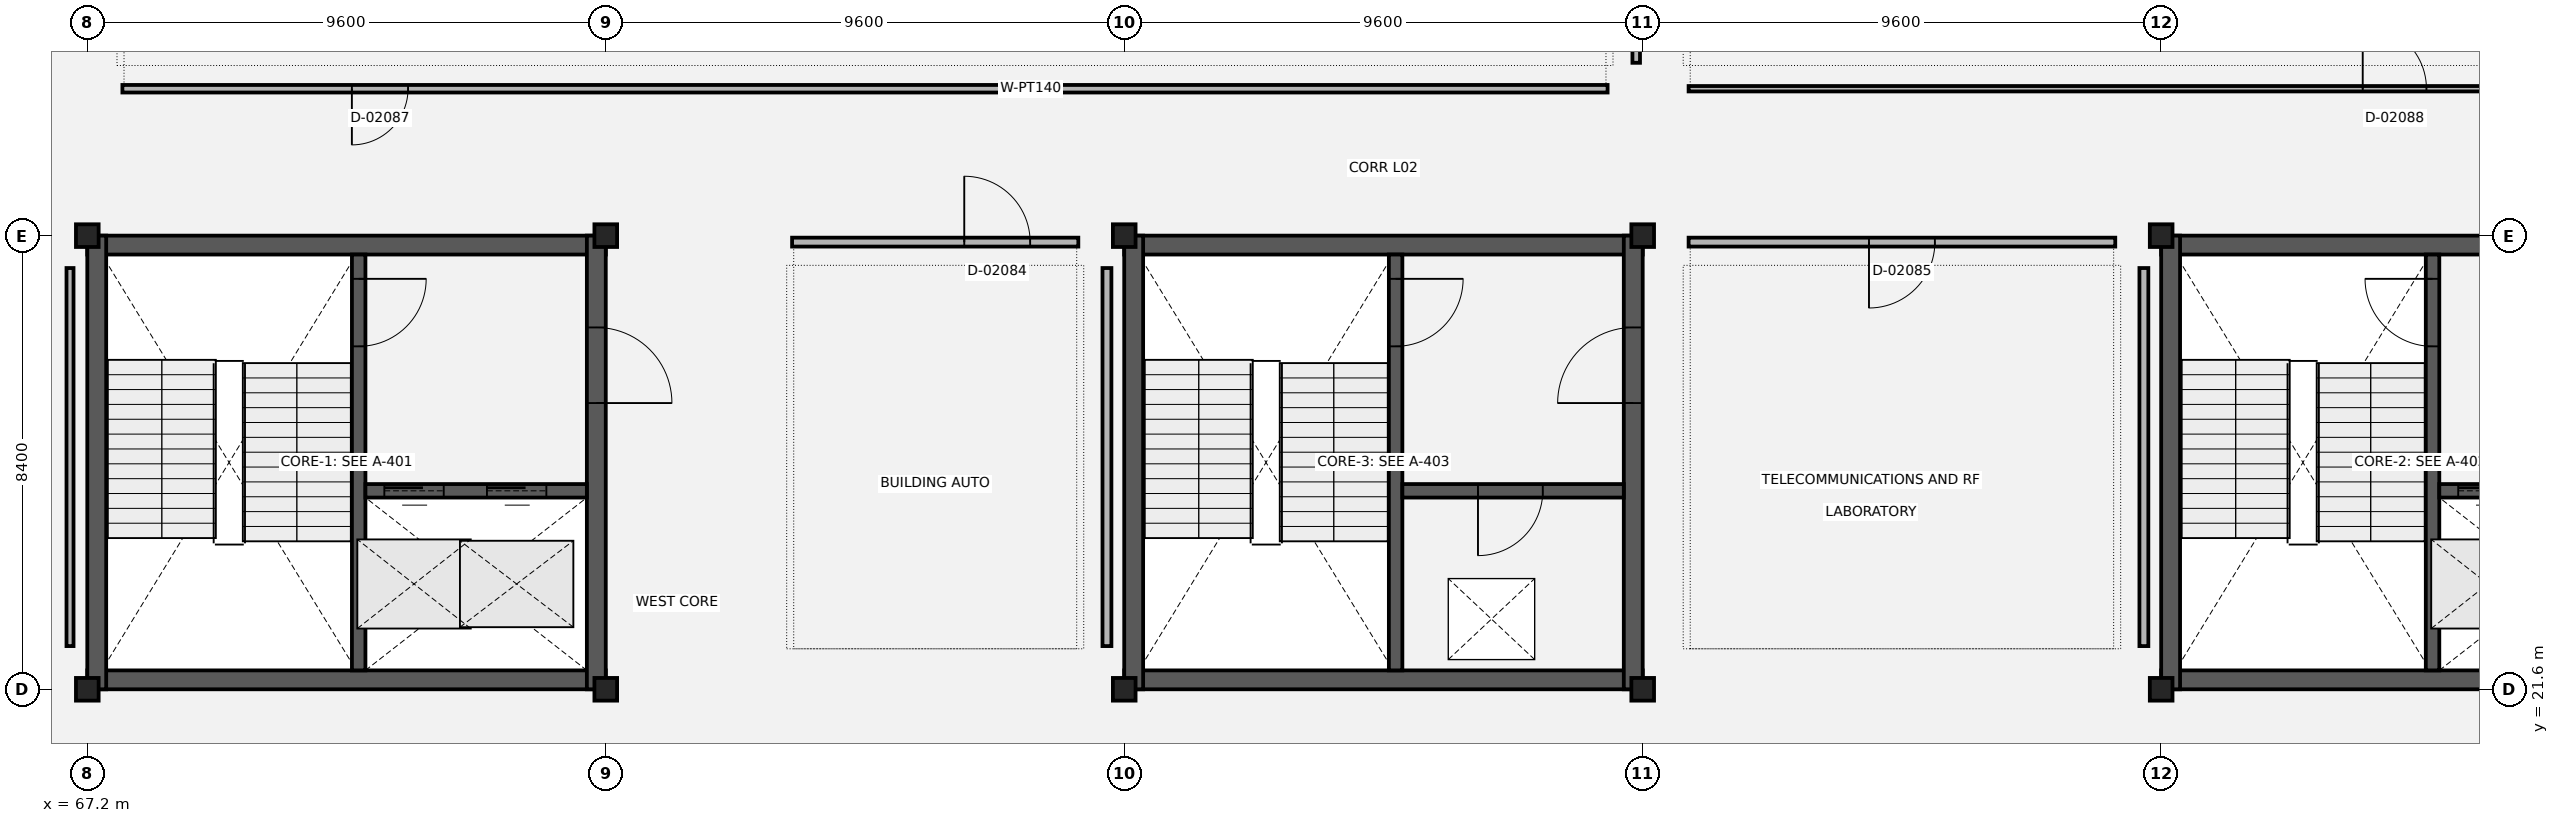
"""IFC4 building model, lengths in metres.
Left out: names, types, materials, properties, quantities, classifications, styles, units other than length and angle.
Written with IfcOpenShell. Run it as: python <this file> out.ifc"""

import sys

from ifc_helpers import new_model, si_unit, direction, frame, frame_2d, origin, origin_2d, place, context, subcontext, project, spatial, rectangle, extrude, element, fill, save


model = new_model("IFC4")
c1 = context("Model", 3, precision=1e-05, world=origin(), true_north=direction((0.0, 1.0)))
c2 = subcontext(c1, "Body", "Model", "MODEL_VIEW")
j1 = project(units=[si_unit("LENGTHUNIT", "METRE"), si_unit("PLANEANGLEUNIT", "RADIAN")], contexts=[c1])
p1 = place(None, origin())
s1 = spatial("IfcSite", under=j1, at=p1, CompositionType="ELEMENT")
p2 = place(p1, origin())
s2 = spatial("IfcBuilding", under=s1, at=p2, CompositionType="ELEMENT")
p3 = place(p2, frame((0.0, 0.0, 10.2)))
s3 = spatial("IfcBuildingStorey", under=s2, at=p3, CompositionType="ELEMENT", Elevation=10.2)
for number, where, z_axis, x_axis in (
    (1, (67.2, 21.6, 0.0), (0.0, 0.0, 1.0), (1.0, 0.0, 0.0)),
    (2, (67.2, 30.0, 0.0), (0.0, 0.0, 1.0), (1.0, 0.0, 0.0)),
    (3, (76.8, 21.6, 0.0), (0.0, 0.0, 1.0), (1.0, 0.0, 0.0)),
    (4, (76.8, 30.0, 0.0), (0.0, 0.0, 1.0), (1.0, 0.0, 0.0)),
    (5, (86.4, 21.6, 0.0), (0.0, 0.0, 1.0), (1.0, 0.0, 0.0)),
    (6, (86.4, 30.0, 0.0), (0.0, 0.0, 1.0), (1.0, 0.0, 0.0)),
    (7, (96.0, 21.6, 0.0), (0.0, 0.0, 1.0), (1.0, 0.0, 0.0)),
    (8, (96.0, 30.0, 0.0), (0.0, 0.0, 1.0), (1.0, 0.0, 0.0)),
    (9, (105.6, 21.6, 0.0), (0.0, 0.0, 1.0), (1.0, 0.0, 0.0)),
    (10, (105.6, 30.0, 0.0), (0.0, 0.0, 1.0), (1.0, 0.0, 0.0)),
):
    element("IfcColumn", number, at=place(p3, frame(where, z_axis=z_axis, x_axis=x_axis)), inside=s3, PredefinedType="COLUMN", context=c2, shape_type="SweptSolid", body=[
        extrude(rectangle(XDim=0.42, YDim=0.42, at=origin_2d()), origin(), (0.0, 0.0, 1.0), 4.2),
    ])
for number, where, z_axis, x_axis in (
    (11, (67.2, 29.825, 0.0), (0.0, 0.0, 1.0), (1.0, 0.0, 0.0)),
    (12, (67.2, 21.775, 0.0), (0.0, 0.0, 1.0), (1.0, 0.0, 0.0)),
):
    element("IfcWall", number, at=place(p3, frame(where, z_axis=z_axis, x_axis=x_axis)), inside=s3, PredefinedType="SHEAR", context=c2, shape_type="SweptSolid", body=[
        extrude(rectangle(XDim=9.6, YDim=0.35, at=frame_2d((4.8, 0.0))), origin(), (0.0, 0.0, 1.0), 3.95),
    ])
p4 = place(p3, frame((67.375, 21.6, 0.0), z_axis=(0.0, 0.0, 1.0), x_axis=(0.0, 1.0, 0.0)))
e13 = element("IfcWall", 13, at=p4, inside=s3, PredefinedType="SHEAR", context=c2, shape_type="SweptSolid", body=[
    extrude(rectangle(XDim=8.4, YDim=0.35, at=frame_2d((4.2, 0.0))), origin(), (0.0, 0.0, 1.0), 3.95),
])
p5 = place(p3, frame((76.625, 21.6, 0.0), z_axis=(0.0, 0.0, 1.0), x_axis=(0.0, 1.0, 0.0)))
e14 = element("IfcWall", 14, at=p5, inside=s3, PredefinedType="SHEAR", context=c2, shape_type="SweptSolid", body=[
    extrude(rectangle(XDim=8.4, YDim=0.35, at=frame_2d((4.2, 0.0))), origin(), (0.0, 0.0, 1.0), 3.95),
])
p6 = place(p5, frame((5.3, 0.0, 0.0)))
e15 = element("IfcOpeningElement", 15, at=p6, cuts=e14, PredefinedType="OPENING", context=c2, shape_type="SweptSolid", body=[
    extrude(rectangle(XDim=1.4, YDim=2.15, at=frame_2d((0.7, 1.075))), frame((0.0, 0.185, 0.0), z_axis=(0.0, -1.0, 0.0), x_axis=(1.0, 0.0, 0.0)), (0.0, 0.0, 1.0), 0.37),
])
p7 = place(p3, frame((72.225, 29.65, 0.0), z_axis=(0.0, 0.0, 1.0), x_axis=(0.0, -1.0, 0.0)))
e16 = element("IfcWall", 16, at=p7, inside=s3, PredefinedType="SHEAR", context=c2, shape_type="SweptSolid", body=[
    extrude(rectangle(XDim=7.7, YDim=0.25, at=frame_2d((3.85, 0.0))), origin(), (0.0, 0.0, 1.0), 3.95),
])
p8 = place(p7, frame((0.45, 0.0, 0.0)))
e17 = element("IfcOpeningElement", 17, at=p8, cuts=e16, PredefinedType="OPENING", context=c2, shape_type="SweptSolid", body=[
    extrude(rectangle(XDim=1.25, YDim=2.15, at=frame_2d((0.625, 1.075))), frame((0.0, 0.135, 0.0), z_axis=(0.0, -1.0, 0.0), x_axis=(1.0, 0.0, 0.0)), (0.0, 0.0, 1.0), 0.27),
])
p9 = place(p3, frame((72.35, 25.275, 0.0), z_axis=(0.0, 0.0, 1.0), x_axis=(1.0, 0.0, 0.0)))
e18 = element("IfcWall", 18, at=p9, inside=s3, PredefinedType="SHEAR", context=c2, shape_type="SweptSolid", body=[
    extrude(rectangle(XDim=4.1, YDim=0.25, at=frame_2d((2.05, 0.0))), origin(), (0.0, 0.0, 1.0), 3.95),
])
p10 = place(p9, frame((0.35, 0.0, 0.0)))
e19 = element("IfcOpeningElement", 19, at=p10, cuts=e18, PredefinedType="OPENING", context=c2, shape_type="SweptSolid", body=[
    extrude(rectangle(XDim=1.1, YDim=2.15, at=frame_2d((0.55, 1.075))), frame((0.0, 0.135, 0.0), z_axis=(0.0, -1.0, 0.0), x_axis=(1.0, 0.0, 0.0)), (0.0, 0.0, 1.0), 0.27),
])
p11 = place(p9, frame((2.25, 0.0, 0.0)))
e20 = element("IfcOpeningElement", 20, at=p11, cuts=e18, PredefinedType="OPENING", context=c2, shape_type="SweptSolid", body=[
    extrude(rectangle(XDim=1.1, YDim=2.15, at=frame_2d((0.55, 1.075))), frame((0.0, 0.135, 0.0), z_axis=(0.0, -1.0, 0.0), x_axis=(1.0, 0.0, 0.0)), (0.0, 0.0, 1.0), 0.27),
])
for number, where, z_axis, x_axis in (
    (21, (105.6, 29.825, 0.0), (0.0, 0.0, 1.0), (1.0, 0.0, 0.0)),
    (22, (105.6, 21.775, 0.0), (0.0, 0.0, 1.0), (1.0, 0.0, 0.0)),
):
    element("IfcWall", number, at=place(p3, frame(where, z_axis=z_axis, x_axis=x_axis)), inside=s3, PredefinedType="SHEAR", context=c2, shape_type="SweptSolid", body=[
        extrude(rectangle(XDim=9.6, YDim=0.35, at=frame_2d((4.8, 0.0))), origin(), (0.0, 0.0, 1.0), 3.95),
    ])
p12 = place(p3, frame((105.775, 21.6, 0.0), z_axis=(0.0, 0.0, 1.0), x_axis=(0.0, 1.0, 0.0)))
e23 = element("IfcWall", 23, at=p12, inside=s3, PredefinedType="SHEAR", context=c2, shape_type="SweptSolid", body=[
    extrude(rectangle(XDim=8.4, YDim=0.35, at=frame_2d((4.2, 0.0))), origin(), (0.0, 0.0, 1.0), 3.95),
])
p13 = place(p3, frame((110.625, 29.65, 0.0), z_axis=(0.0, 0.0, 1.0), x_axis=(0.0, -1.0, 0.0)))
e24 = element("IfcWall", 24, at=p13, inside=s3, PredefinedType="SHEAR", context=c2, shape_type="SweptSolid", body=[
    extrude(rectangle(XDim=7.7, YDim=0.25, at=frame_2d((3.85, 0.0))), origin(), (0.0, 0.0, 1.0), 3.95),
])
p14 = place(p13, frame((0.45, 0.0, 0.0)))
e25 = element("IfcOpeningElement", 25, at=p14, cuts=e24, PredefinedType="OPENING", context=c2, shape_type="SweptSolid", body=[
    extrude(rectangle(XDim=1.25, YDim=2.15, at=frame_2d((0.625, 1.075))), frame((0.0, 0.135, 0.0), z_axis=(0.0, -1.0, 0.0), x_axis=(1.0, 0.0, 0.0)), (0.0, 0.0, 1.0), 0.27),
])
p15 = place(p3, frame((110.75, 25.275, 0.0), z_axis=(0.0, 0.0, 1.0), x_axis=(1.0, 0.0, 0.0)))
e26 = element("IfcWall", 26, at=p15, inside=s3, PredefinedType="SHEAR", context=c2, shape_type="SweptSolid", body=[
    extrude(rectangle(XDim=4.1, YDim=0.25, at=frame_2d((2.05, 0.0))), origin(), (0.0, 0.0, 1.0), 3.95),
])
p16 = place(p15, frame((0.35, 0.0, 0.0)))
e27 = element("IfcOpeningElement", 27, at=p16, cuts=e26, PredefinedType="OPENING", context=c2, shape_type="SweptSolid", body=[
    extrude(rectangle(XDim=1.1, YDim=2.15, at=frame_2d((0.55, 1.075))), frame((0.0, 0.135, 0.0), z_axis=(0.0, -1.0, 0.0), x_axis=(1.0, 0.0, 0.0)), (0.0, 0.0, 1.0), 0.27),
])
p17 = place(p15, frame((2.25, 0.0, 0.0)))
e28 = element("IfcOpeningElement", 28, at=p17, cuts=e26, PredefinedType="OPENING", context=c2, shape_type="SweptSolid", body=[
    extrude(rectangle(XDim=1.1, YDim=2.15, at=frame_2d((0.55, 1.075))), frame((0.0, 0.135, 0.0), z_axis=(0.0, -1.0, 0.0), x_axis=(1.0, 0.0, 0.0)), (0.0, 0.0, 1.0), 0.27),
])
for number, where, z_axis, x_axis in (
    (29, (86.4, 29.825, 0.0), (0.0, 0.0, 1.0), (1.0, 0.0, 0.0)),
    (30, (86.4, 21.775, 0.0), (0.0, 0.0, 1.0), (1.0, 0.0, 0.0)),
):
    element("IfcWall", number, at=place(p3, frame(where, z_axis=z_axis, x_axis=x_axis)), inside=s3, PredefinedType="SHEAR", context=c2, shape_type="SweptSolid", body=[
        extrude(rectangle(XDim=9.6, YDim=0.35, at=frame_2d((4.8, 0.0))), origin(), (0.0, 0.0, 1.0), 3.95),
    ])
p18 = place(p3, frame((86.575, 21.6, 0.0), z_axis=(0.0, 0.0, 1.0), x_axis=(0.0, 1.0, 0.0)))
e31 = element("IfcWall", 31, at=p18, inside=s3, PredefinedType="SHEAR", context=c2, shape_type="SweptSolid", body=[
    extrude(rectangle(XDim=8.4, YDim=0.35, at=frame_2d((4.2, 0.0))), origin(), (0.0, 0.0, 1.0), 3.95),
])
p19 = place(p3, frame((95.825, 21.6, 0.0), z_axis=(0.0, 0.0, 1.0), x_axis=(0.0, 1.0, 0.0)))
e32 = element("IfcWall", 32, at=p19, inside=s3, PredefinedType="SHEAR", context=c2, shape_type="SweptSolid", body=[
    extrude(rectangle(XDim=8.4, YDim=0.35, at=frame_2d((4.2, 0.0))), origin(), (0.0, 0.0, 1.0), 3.95),
])
p20 = place(p19, frame((5.3, 0.0, 0.0)))
e33 = element("IfcOpeningElement", 33, at=p20, cuts=e32, PredefinedType="OPENING", context=c2, shape_type="SweptSolid", body=[
    extrude(rectangle(XDim=1.4, YDim=2.15, at=frame_2d((0.7, 1.075))), frame((0.0, 0.185, 0.0), z_axis=(0.0, -1.0, 0.0), x_axis=(1.0, 0.0, 0.0)), (0.0, 0.0, 1.0), 0.37),
])
p21 = place(p3, frame((91.425, 29.65, 0.0), z_axis=(0.0, 0.0, 1.0), x_axis=(0.0, -1.0, 0.0)))
e34 = element("IfcWall", 34, at=p21, inside=s3, PredefinedType="SHEAR", context=c2, shape_type="SweptSolid", body=[
    extrude(rectangle(XDim=7.7, YDim=0.25, at=frame_2d((3.85, 0.0))), origin(), (0.0, 0.0, 1.0), 3.95),
])
p22 = place(p21, frame((0.45, 0.0, 0.0)))
e35 = element("IfcOpeningElement", 35, at=p22, cuts=e34, PredefinedType="OPENING", context=c2, shape_type="SweptSolid", body=[
    extrude(rectangle(XDim=1.25, YDim=2.15, at=frame_2d((0.625, 1.075))), frame((0.0, 0.135, 0.0), z_axis=(0.0, -1.0, 0.0), x_axis=(1.0, 0.0, 0.0)), (0.0, 0.0, 1.0), 0.27),
])
p23 = place(p3, frame((91.55, 25.275, 0.0), z_axis=(0.0, 0.0, 1.0), x_axis=(1.0, 0.0, 0.0)))
e36 = element("IfcWall", 36, at=p23, inside=s3, PredefinedType="SHEAR", context=c2, shape_type="SweptSolid", body=[
    extrude(rectangle(XDim=4.1, YDim=0.25, at=frame_2d((2.05, 0.0))), origin(), (0.0, 0.0, 1.0), 3.95),
])
p24 = place(p23, frame((1.4, 0.0, 0.0)))
e37 = element("IfcOpeningElement", 37, at=p24, cuts=e36, PredefinedType="OPENING", context=c2, shape_type="SweptSolid", body=[
    extrude(rectangle(XDim=1.2, YDim=2.15, at=frame_2d((0.6, 1.075))), frame((0.0, 0.135, 0.0), z_axis=(0.0, -1.0, 0.0), x_axis=(1.0, 0.0, 0.0)), (0.0, 0.0, 1.0), 0.27),
])
p25 = place(p3, frame((66.88, 22.4, 0.0), z_axis=(0.0, 0.0, 1.0), x_axis=(0.0, 1.0, 0.0)))
e38 = element("IfcWall", 38, at=p25, inside=s3, PredefinedType="PARTITIONING", context=c2, shape_type="SweptSolid", body=[
    extrude(rectangle(XDim=7.0, YDim=0.13, at=frame_2d((3.5, 0.0))), origin(), (0.0, 0.0, 1.0), 3.03),
])
p26 = place(p3, frame((80.25, 29.88, 0.0), z_axis=(0.0, 0.0, 1.0), x_axis=(1.0, 0.0, 0.0)))
e39 = element("IfcWall", 39, at=p26, inside=s3, PredefinedType="PARTITIONING", context=c2, shape_type="SweptSolid", body=[
    extrude(rectangle(XDim=5.3, YDim=0.165, at=frame_2d((2.65, 0.0))), origin(), (0.0, 0.0, 1.0), 3.03),
])
p27 = place(p26, frame((3.188, 0.0, 0.0)))
e40 = element("IfcOpeningElement", 40, at=p27, cuts=e39, PredefinedType="OPENING", context=c2, shape_type="SweptSolid", body=[
    extrude(rectangle(XDim=1.22, YDim=2.15, at=frame_2d((0.61, 1.075))), frame((0.0, 0.093, 0.0), z_axis=(0.0, -1.0, 0.0), x_axis=(1.0, 0.0, 0.0)), (0.0, 0.0, 1.0), 0.185),
])
p28 = place(p3, frame((86.08, 22.4, 0.0), z_axis=(0.0, 0.0, 1.0), x_axis=(0.0, 1.0, 0.0)))
e41 = element("IfcWall", 41, at=p28, inside=s3, PredefinedType="PARTITIONING", context=c2, shape_type="SweptSolid", body=[
    extrude(rectangle(XDim=7.0, YDim=0.165, at=frame_2d((3.5, 0.0))), origin(), (0.0, 0.0, 1.0), 3.03),
])
p29 = place(p3, frame((96.85, 29.88, 0.0), z_axis=(0.0, 0.0, 1.0), x_axis=(1.0, 0.0, 0.0)))
e42 = element("IfcWall", 42, at=p29, inside=s3, PredefinedType="PARTITIONING", context=c2, shape_type="SweptSolid", body=[
    extrude(rectangle(XDim=7.9, YDim=0.165, at=frame_2d((3.95, 0.0))), origin(), (0.0, 0.0, 1.0), 3.03),
])
p30 = place(p29, frame((3.34, 0.0, 0.0)))
e43 = element("IfcOpeningElement", 43, at=p30, cuts=e42, PredefinedType="OPENING", context=c2, shape_type="SweptSolid", body=[
    extrude(rectangle(XDim=1.22, YDim=2.15, at=frame_2d((0.61, 1.075))), frame((0.0, 0.093, 0.0), z_axis=(0.0, -1.0, 0.0), x_axis=(1.0, 0.0, 0.0)), (0.0, 0.0, 1.0), 0.185),
])
p31 = place(p3, frame((105.28, 22.4, 0.0), z_axis=(0.0, 0.0, 1.0), x_axis=(0.0, 1.0, 0.0)))
e44 = element("IfcWall", 44, at=p31, inside=s3, PredefinedType="PARTITIONING", context=c2, shape_type="SweptSolid", body=[
    extrude(rectangle(XDim=7.0, YDim=0.165, at=frame_2d((3.5, 0.0))), origin(), (0.0, 0.0, 1.0), 3.03),
])
p32 = place(p3, frame((67.85, 32.72, 0.0), z_axis=(0.0, 0.0, 1.0), x_axis=(1.0, 0.0, 0.0)))
e45 = element("IfcWall", 45, at=p32, inside=s3, PredefinedType="PARTITIONING", context=c2, shape_type="SweptSolid", body=[
    extrude(rectangle(XDim=27.5, YDim=0.14, at=frame_2d((13.75, 0.0))), origin(), (0.0, 0.0, 1.0), 3.03),
])
p33 = place(p32, frame((4.249, 0.0, 0.0)))
e46 = element("IfcOpeningElement", 46, at=p33, cuts=e45, PredefinedType="OPENING", context=c2, shape_type="SweptSolid", body=[
    extrude(rectangle(XDim=1.04, YDim=2.15, at=frame_2d((0.52, 1.075))), frame((0.0, 0.08, 0.0), z_axis=(0.0, -1.0, 0.0), x_axis=(1.0, 0.0, 0.0)), (0.0, 0.0, 1.0), 0.16),
])
p34 = place(p3, frame((95.88, 33.2, 0.0), z_axis=(0.0, 0.0, 1.0), x_axis=(0.0, 1.0, 0.0)))
e47 = element("IfcWall", 47, at=p34, inside=s3, PredefinedType="PARTITIONING", context=c2, shape_type="SweptSolid", body=[
    extrude(rectangle(XDim=4.2, YDim=0.14, at=frame_2d((2.1, 0.0))), origin(), (0.0, 0.0, 1.0), 3.03),
])
p35 = place(p3, frame((96.85, 32.72, 0.0), z_axis=(0.0, 0.0, 1.0), x_axis=(1.0, 0.0, 0.0)))
e48 = element("IfcWall", 48, at=p35, inside=s3, PredefinedType="MOVABLE", context=c2, shape_type="SweptSolid", body=[
    extrude(rectangle(XDim=36.5, YDim=0.1, at=frame_2d((18.25, 0.0))), origin(), (0.0, 0.0, 1.0), 3.03),
])
p36 = place(p35, frame((12.482, 0.0, 0.0)))
e49 = element("IfcOpeningElement", 49, at=p36, cuts=e48, PredefinedType="OPENING", context=c2, shape_type="SweptSolid", body=[
    extrude(rectangle(XDim=1.18, YDim=2.15, at=frame_2d((0.59, 1.075))), frame((0.0, 0.06, 0.0), z_axis=(0.0, -1.0, 0.0), x_axis=(1.0, 0.0, 0.0)), (0.0, 0.0, 1.0), 0.12),
])
p37 = place(p8, origin())
e50 = element("IfcDoor", 50, at=p37, inside=s3, OperationType="SINGLE_SWING_LEFT", PredefinedType="DOOR", context=c2, shape_type="SweptSolid", body=[
    extrude(rectangle(XDim=1.25, YDim=2.15, at=frame_2d((0.625, 1.075))), frame((0.0, 0.025, 0.0), z_axis=(0.0, -1.0, 0.0), x_axis=(1.0, 0.0, 0.0)), (0.0, 0.0, 1.0), 0.05),
])
fill(e17, e50)
p38 = place(p10, origin())
e51 = element("IfcDoor", 51, at=p38, inside=s3, OperationType="SLIDING_TO_LEFT", PredefinedType="DOOR", context=c2, shape_type="SweptSolid", body=[
    extrude(rectangle(XDim=1.1, YDim=2.15, at=frame_2d((0.55, 1.075))), frame((0.0, 0.025, 0.0), z_axis=(0.0, -1.0, 0.0), x_axis=(1.0, 0.0, 0.0)), (0.0, 0.0, 1.0), 0.05),
])
fill(e19, e51)
p39 = place(p11, origin())
e52 = element("IfcDoor", 52, at=p39, inside=s3, OperationType="SLIDING_TO_LEFT", PredefinedType="DOOR", context=c2, shape_type="SweptSolid", body=[
    extrude(rectangle(XDim=1.1, YDim=2.15, at=frame_2d((0.55, 1.075))), frame((0.0, 0.025, 0.0), z_axis=(0.0, -1.0, 0.0), x_axis=(1.0, 0.0, 0.0)), (0.0, 0.0, 1.0), 0.05),
])
fill(e20, e52)
p40 = place(p6, origin())
e53 = element("IfcDoor", 53, at=p40, inside=s3, OperationType="SINGLE_SWING_RIGHT", PredefinedType="DOOR", context=c2, shape_type="SweptSolid", body=[
    extrude(rectangle(XDim=1.4, YDim=2.15, at=frame_2d((0.7, 1.075))), frame((0.0, 0.025, 0.0), z_axis=(0.0, -1.0, 0.0), x_axis=(1.0, 0.0, 0.0)), (0.0, 0.0, 1.0), 0.05),
])
fill(e15, e53)
p41 = place(p14, origin())
e54 = element("IfcDoor", 54, at=p41, inside=s3, OperationType="SINGLE_SWING_RIGHT", PredefinedType="DOOR", context=c2, shape_type="SweptSolid", body=[
    extrude(rectangle(XDim=1.25, YDim=2.15, at=frame_2d((0.625, 1.075))), frame((0.0, 0.025, 0.0), z_axis=(0.0, -1.0, 0.0), x_axis=(1.0, 0.0, 0.0)), (0.0, 0.0, 1.0), 0.05),
])
fill(e25, e54)
p42 = place(p16, origin())
e55 = element("IfcDoor", 55, at=p42, inside=s3, OperationType="SLIDING_TO_LEFT", PredefinedType="DOOR", context=c2, shape_type="SweptSolid", body=[
    extrude(rectangle(XDim=1.1, YDim=2.15, at=frame_2d((0.55, 1.075))), frame((0.0, 0.025, 0.0), z_axis=(0.0, -1.0, 0.0), x_axis=(1.0, 0.0, 0.0)), (0.0, 0.0, 1.0), 0.05),
])
fill(e27, e55)
p43 = place(p22, origin())
e56 = element("IfcDoor", 56, at=p43, inside=s3, OperationType="SINGLE_SWING_LEFT", PredefinedType="DOOR", context=c2, shape_type="SweptSolid", body=[
    extrude(rectangle(XDim=1.25, YDim=2.15, at=frame_2d((0.625, 1.075))), frame((0.0, 0.025, 0.0), z_axis=(0.0, -1.0, 0.0), x_axis=(1.0, 0.0, 0.0)), (0.0, 0.0, 1.0), 0.05),
])
fill(e35, e56)
p44 = place(p24, origin())
e57 = element("IfcDoor", 57, at=p44, inside=s3, OperationType="SINGLE_SWING_RIGHT", PredefinedType="DOOR", context=c2, shape_type="SweptSolid", body=[
    extrude(rectangle(XDim=1.2, YDim=2.15, at=frame_2d((0.6, 1.075))), frame((0.0, 0.025, 0.0), z_axis=(0.0, -1.0, 0.0), x_axis=(1.0, 0.0, 0.0)), (0.0, 0.0, 1.0), 0.05),
])
fill(e37, e57)
p45 = place(p20, origin())
e58 = element("IfcDoor", 58, at=p45, inside=s3, OperationType="SINGLE_SWING_LEFT", PredefinedType="DOOR", context=c2, shape_type="SweptSolid", body=[
    extrude(rectangle(XDim=1.4, YDim=2.15, at=frame_2d((0.7, 1.075))), frame((0.0, 0.025, 0.0), z_axis=(0.0, -1.0, 0.0), x_axis=(1.0, 0.0, 0.0)), (0.0, 0.0, 1.0), 0.05),
])
fill(e33, e58)
p46 = place(p27, origin())
e59 = element("IfcDoor", 59, at=p46, inside=s3, OperationType="SINGLE_SWING_LEFT", PredefinedType="DOOR", context=c2, shape_type="SweptSolid", body=[
    extrude(rectangle(XDim=1.22, YDim=2.15, at=frame_2d((0.61, 1.075))), frame((0.0, 0.025, 0.0), z_axis=(0.0, -1.0, 0.0), x_axis=(1.0, 0.0, 0.0)), (0.0, 0.0, 1.0), 0.05),
])
fill(e40, e59)
p47 = place(p30, origin())
e60 = element("IfcDoor", 60, at=p47, inside=s3, OperationType="SINGLE_SWING_RIGHT", PredefinedType="DOOR", context=c2, shape_type="SweptSolid", body=[
    extrude(rectangle(XDim=1.22, YDim=2.15, at=frame_2d((0.61, 1.075))), frame((0.0, 0.025, 0.0), z_axis=(0.0, -1.0, 0.0), x_axis=(1.0, 0.0, 0.0)), (0.0, 0.0, 1.0), 0.05),
])
fill(e43, e60)
p48 = place(p33, origin())
e61 = element("IfcDoor", 61, at=p48, inside=s3, OperationType="SINGLE_SWING_RIGHT", PredefinedType="DOOR", context=c2, shape_type="SweptSolid", body=[
    extrude(rectangle(XDim=1.04, YDim=2.15, at=frame_2d((0.52, 1.075))), frame((0.0, 0.025, 0.0), z_axis=(0.0, -1.0, 0.0), x_axis=(1.0, 0.0, 0.0)), (0.0, 0.0, 1.0), 0.05),
])
fill(e46, e61)
p49 = place(p36, origin())
e62 = element("IfcDoor", 62, at=p49, inside=s3, OperationType="SINGLE_SWING_LEFT", PredefinedType="DOOR", context=c2, shape_type="SweptSolid", body=[
    extrude(rectangle(XDim=1.18, YDim=2.15, at=frame_2d((0.59, 1.075))), frame((0.0, 0.025, 0.0), z_axis=(0.0, -1.0, 0.0), x_axis=(1.0, 0.0, 0.0)), (0.0, 0.0, 1.0), 0.05),
])
fill(e49, e62)
save(model, sys.argv[1])
